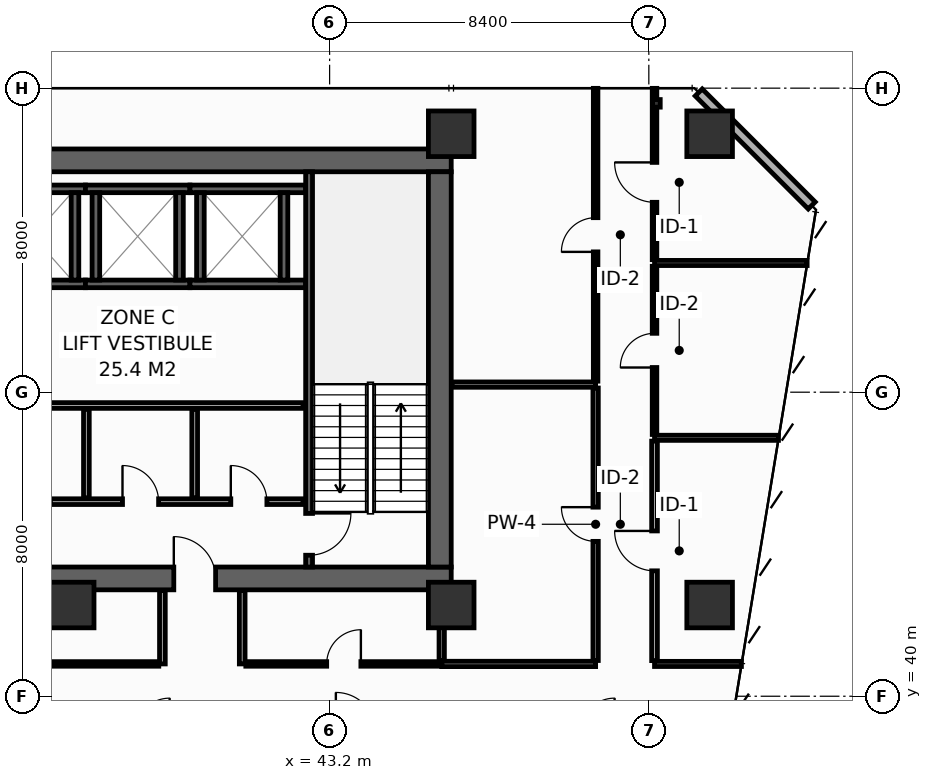
"""IFC4 building model, lengths in metres.
Left out: names, types, materials, properties, quantities, classifications, styles, units other than length and angle.
Written with IfcOpenShell. Run it as: python <this file> out.ifc"""

import sys

from ifc_helpers import new_model, si_unit, direction, frame, frame_2d, origin, origin_2d, place, context, subcontext, project, spatial, rectangle, hollow_rectangle, extrude, element, fill, save


model = new_model("IFC4")
c1 = context("Model", 3, precision=1e-05, world=origin(), true_north=direction((0.0, 1.0)))
c2 = subcontext(c1, "Body", "Model", "MODEL_VIEW")
j1 = project(units=[si_unit("LENGTHUNIT", "METRE"), si_unit("PLANEANGLEUNIT", "RADIAN")], contexts=[c1])
p1 = place(None, origin())
s1 = spatial("IfcSite", under=j1, at=p1, CompositionType="ELEMENT")
p2 = place(p1, origin())
s2 = spatial("IfcBuilding", under=s1, at=p2, CompositionType="ELEMENT")
p3 = place(p2, frame((0.0, 0.0, 69.2)))
s3 = spatial("IfcBuildingStorey", under=s2, at=p3, CompositionType="ELEMENT", Elevation=69.2)
p4 = place(p3, frame((13.5, 43.1, 0.0), z_axis=(0.0, 0.0, 1.0), x_axis=(1.0, 0.0, 0.0)))
e1 = element("IfcWall", 1, at=p4, inside=s3, PredefinedType="SHEAR", context=c2, shape_type="SweptSolid", body=[
    extrude(rectangle(XDim=32.9, YDim=0.6, at=frame_2d((16.45, 0.0))), origin(), (0.0, 0.0, 1.0), 4.15),
])
p5 = place(p4, frame((5.4, 0.0, 0.0)))
e2 = element("IfcOpeningElement", 2, at=p5, cuts=e1, PredefinedType="OPENING", context=c2, shape_type="SweptSolid", body=[
    extrude(rectangle(XDim=1.1, YDim=2.15, at=frame_2d((0.55, 1.075))), frame((0.0, 0.31, 0.0), z_axis=(0.0, -1.0, 0.0), x_axis=(1.0, 0.0, 0.0)), (0.0, 0.0, 1.0), 0.62),
])
p6 = place(p4, frame((25.6, 0.0, 0.0)))
e3 = element("IfcOpeningElement", 3, at=p6, cuts=e1, PredefinedType="OPENING", context=c2, shape_type="SweptSolid", body=[
    extrude(rectangle(XDim=1.1, YDim=2.15, at=frame_2d((0.55, 1.075))), frame((0.0, 0.31, 0.0), z_axis=(0.0, -1.0, 0.0), x_axis=(1.0, 0.0, 0.0)), (0.0, 0.0, 1.0), 0.62),
])
p7 = place(p3, frame((13.5, 54.1, 0.0), z_axis=(0.0, 0.0, 1.0), x_axis=(1.0, 0.0, 0.0)))
e4 = element("IfcWall", 4, at=p7, inside=s3, PredefinedType="SHEAR", context=c2, shape_type="SweptSolid", body=[
    extrude(rectangle(XDim=32.9, YDim=0.6, at=frame_2d((16.45, 0.0))), origin(), (0.0, 0.0, 1.0), 4.15),
])
p8 = place(p3, frame((46.1, 43.4, 0.0), z_axis=(0.0, 0.0, 1.0), x_axis=(0.0, 1.0, 0.0)))
e5 = element("IfcWall", 5, at=p8, inside=s3, PredefinedType="SHEAR", context=c2, shape_type="SweptSolid", body=[
    extrude(rectangle(XDim=10.4, YDim=0.6, at=frame_2d((5.2, 0.0))), origin(), (0.0, 0.0, 1.0), 4.15),
])
for number, where, z_axis, x_axis in (
    (6, (46.4, 54.8, 0.0), (0.0, 0.0, 1.0), (1.0, 0.0, 0.0)),
    (7, (53.2, 54.8, 0.0), (0.0, 0.0, 1.0), (1.0, 0.0, 0.0)),
    (8, (36.4, 42.4, 0.0), (0.0, 0.0, 1.0), (1.0, 0.0, 0.0)),
    (9, (46.4, 42.4, 0.0), (0.0, 0.0, 1.0), (1.0, 0.0, 0.0)),
    (10, (53.2, 42.4, 0.0), (0.0, 0.0, 1.0), (1.0, 0.0, 0.0)),
):
    element("IfcColumn", number, at=place(p3, frame(where, z_axis=z_axis, x_axis=x_axis)), inside=s3, PredefinedType="COLUMN", context=c2, shape_type="SweptSolid", body=[
        extrude(hollow_rectangle(XDim=1.2, YDim=1.2, WallThickness=0.055, at=origin_2d()), origin(), (0.0, 0.0, 1.0), 4.4),
    ])
p9 = place(p3, frame((51.8, 55.6, 0.0), z_axis=(0.0, 0.0, 1.0), x_axis=(1.0, 0.0, 0.0)))
e11 = element("IfcColumn", 11, at=p9, inside=s3, PredefinedType="PILASTER", context=c2, shape_type="SweptSolid", body=[
    extrude(hollow_rectangle(XDim=0.2, YDim=0.2, WallThickness=0.01, at=origin_2d()), origin(), (0.0, 0.0, 1.0), 4.4),
])
for number, where, z_axis, x_axis in (
    (12, (33.95, 50.85, 0.0), (0.0, 0.0, 1.0), (1.0, 0.0, 0.0)),
    (13, (33.95, 53.35, 0.0), (0.0, 0.0, 1.0), (1.0, 0.0, 0.0)),
):
    element("IfcWall", number, at=place(p3, frame(where, z_axis=z_axis, x_axis=x_axis)), inside=s3, PredefinedType="SHEAR", context=c2, shape_type="SweptSolid", body=[
        extrude(rectangle(XDim=2.825, YDim=0.2, at=frame_2d((1.413, 0.0))), origin(), (0.0, 0.0, 1.0), 4.15),
    ])
p10 = place(p3, frame((36.5, 50.95, 0.0), z_axis=(0.0, 0.0, 1.0), x_axis=(0.0, 1.0, 0.0)))
e14 = element("IfcWall", 14, at=p10, inside=s3, PredefinedType="SHEAR", context=c2, shape_type="SweptSolid", body=[
    extrude(rectangle(XDim=2.3, YDim=0.2, at=frame_2d((1.15, 0.0))), origin(), (0.0, 0.0, 1.0), 4.15),
])
for number, where, z_axis, x_axis in (
    (15, (36.775, 50.85, 0.0), (0.0, 0.0, 1.0), (1.0, 0.0, 0.0)),
    (16, (36.775, 53.35, 0.0), (0.0, 0.0, 1.0), (1.0, 0.0, 0.0)),
):
    element("IfcWall", number, at=place(p3, frame(where, z_axis=z_axis, x_axis=x_axis)), inside=s3, PredefinedType="SHEAR", context=c2, shape_type="SweptSolid", body=[
        extrude(rectangle(XDim=2.75, YDim=0.2, at=frame_2d((1.375, 0.0))), origin(), (0.0, 0.0, 1.0), 4.15),
    ])
for number, where, z_axis, x_axis in (
    (17, (37.05, 50.95, 0.0), (0.0, 0.0, 1.0), (0.0, 1.0, 0.0)),
    (18, (39.25, 50.95, 0.0), (0.0, 0.0, 1.0), (0.0, 1.0, 0.0)),
):
    element("IfcWall", number, at=place(p3, frame(where, z_axis=z_axis, x_axis=x_axis)), inside=s3, PredefinedType="SHEAR", context=c2, shape_type="SweptSolid", body=[
        extrude(rectangle(XDim=2.3, YDim=0.2, at=frame_2d((1.15, 0.0))), origin(), (0.0, 0.0, 1.0), 4.15),
    ])
for number, where, z_axis, x_axis in (
    (19, (39.525, 50.85, 0.0), (0.0, 0.0, 1.0), (1.0, 0.0, 0.0)),
    (20, (39.525, 53.35, 0.0), (0.0, 0.0, 1.0), (1.0, 0.0, 0.0)),
):
    element("IfcWall", number, at=place(p3, frame(where, z_axis=z_axis, x_axis=x_axis)), inside=s3, PredefinedType="SHEAR", context=c2, shape_type="SweptSolid", body=[
        extrude(rectangle(XDim=3.045, YDim=0.2, at=frame_2d((1.522, 0.0))), origin(), (0.0, 0.0, 1.0), 4.15),
    ])
for number, where, z_axis, x_axis in (
    (21, (39.8, 50.95, 0.0), (0.0, 0.0, 1.0), (0.0, 1.0, 0.0)),
    (22, (42.0, 50.95, 0.0), (0.0, 0.0, 1.0), (0.0, 1.0, 0.0)),
):
    element("IfcWall", number, at=place(p3, frame(where, z_axis=z_axis, x_axis=x_axis)), inside=s3, PredefinedType="SHEAR", context=c2, shape_type="SweptSolid", body=[
        extrude(rectangle(XDim=2.3, YDim=0.2, at=frame_2d((1.15, 0.0))), origin(), (0.0, 0.0, 1.0), 4.15),
    ])
p11 = place(p3, frame((42.66, 53.8, 0.0), z_axis=(0.0, 0.0, 1.0), x_axis=(0.0, -1.0, 0.0)))
e23 = element("IfcWall", 23, at=p11, inside=s3, PredefinedType="SHEAR", context=c2, shape_type="SweptSolid", body=[
    extrude(rectangle(XDim=10.4, YDim=0.18, at=frame_2d((5.2, 0.0))), origin(), (0.0, 0.0, 1.0), 4.15),
])
p12 = place(p11, frame((8.99, 0.0, 0.0)))
e24 = element("IfcOpeningElement", 24, at=p12, cuts=e23, PredefinedType="OPENING", context=c2, shape_type="SweptSolid", body=[
    extrude(rectangle(XDim=1.1, YDim=2.15, at=frame_2d((0.55, 1.075))), frame((0.0, 0.1, 0.0), z_axis=(0.0, -1.0, 0.0), x_axis=(1.0, 0.0, 0.0)), (0.0, 0.0, 1.0), 0.2),
])
p13 = place(p3, frame((33.95, 45.12, 0.0), z_axis=(0.0, 0.0, 1.0), x_axis=(1.0, 0.0, 0.0)))
e25 = element("IfcWall", 25, at=p13, inside=s3, PredefinedType="PARTITIONING", context=c2, shape_type="SweptSolid", body=[
    extrude(rectangle(XDim=8.55, YDim=0.15, at=frame_2d((4.275, 0.0))), origin(), (0.0, 0.0, 1.0), 4.15),
])
p14 = place(p13, frame((0.95, 0.0, 0.0)))
e26 = element("IfcOpeningElement", 26, at=p14, cuts=e25, PredefinedType="OPENING", context=c2, shape_type="SweptSolid", body=[
    extrude(rectangle(XDim=0.95, YDim=2.15, at=frame_2d((0.475, 1.075))), frame((0.0, 0.085, 0.0), z_axis=(0.0, -1.0, 0.0), x_axis=(1.0, 0.0, 0.0)), (0.0, 0.0, 1.0), 0.17),
])
p15 = place(p13, frame((3.8, 0.0, 0.0)))
e27 = element("IfcOpeningElement", 27, at=p15, cuts=e25, PredefinedType="OPENING", context=c2, shape_type="SweptSolid", body=[
    extrude(rectangle(XDim=0.95, YDim=2.15, at=frame_2d((0.475, 1.075))), frame((0.0, 0.085, 0.0), z_axis=(0.0, -1.0, 0.0), x_axis=(1.0, 0.0, 0.0)), (0.0, 0.0, 1.0), 0.17),
])
p16 = place(p13, frame((6.65, 0.0, 0.0)))
e28 = element("IfcOpeningElement", 28, at=p16, cuts=e25, PredefinedType="OPENING", context=c2, shape_type="SweptSolid", body=[
    extrude(rectangle(XDim=0.95, YDim=2.15, at=frame_2d((0.475, 1.075))), frame((0.0, 0.085, 0.0), z_axis=(0.0, -1.0, 0.0), x_axis=(1.0, 0.0, 0.0)), (0.0, 0.0, 1.0), 0.17),
])
p17 = place(p3, frame((33.95, 47.65, 0.0), z_axis=(0.0, 0.0, 1.0), x_axis=(1.0, 0.0, 0.0)))
e29 = element("IfcWall", 29, at=p17, inside=s3, PredefinedType="PARTITIONING", context=c2, shape_type="SweptSolid", body=[
    extrude(rectangle(XDim=8.55, YDim=0.15, at=frame_2d((4.275, 0.0))), origin(), (0.0, 0.0, 1.0), 4.15),
])
for number, where, z_axis, x_axis in (
    (30, (36.8, 45.22, 0.0), (0.0, 0.0, 1.0), (0.0, 1.0, 0.0)),
    (31, (39.65, 45.22, 0.0), (0.0, 0.0, 1.0), (0.0, 1.0, 0.0)),
):
    element("IfcWall", number, at=place(p3, frame(where, z_axis=z_axis, x_axis=x_axis)), inside=s3, PredefinedType="PARTITIONING", context=c2, shape_type="SweptSolid", body=[
        extrude(rectangle(XDim=2.33, YDim=0.15, at=frame_2d((1.165, 0.0))), origin(), (0.0, 0.0, 1.0), 4.15),
    ])
p18 = place(p3, frame((55.887, 52.913, 0.0), z_axis=(0.0, 0.0, 1.0), x_axis=(-0.707106781187, 0.707106781187, 0.0)))
e32 = element("IfcWall", 32, at=p18, inside=s3, PredefinedType="STANDARD", context=c2, shape_type="SweptSolid", body=[
    extrude(rectangle(XDim=4.206, YDim=0.26, at=frame_2d((2.103, 0.0))), origin(), (0.0, 0.0, 1.0), 4.15),
])
p19 = place(p3, frame((46.15, 40.85, 0.0), z_axis=(0.0, 0.0, 1.0), x_axis=(1.0, 0.0, 0.0)))
e33 = element("IfcWall", 33, at=p19, inside=s3, PredefinedType="PARTITIONING", context=c2, shape_type="SweptSolid", body=[
    extrude(rectangle(XDim=4.05, YDim=0.14, at=frame_2d((2.025, 0.0))), origin(), (0.0, 0.0, 1.0), 4.15),
])
p20 = place(p3, frame((46.15, 40.94, 0.0), z_axis=(0.0, 0.0, 1.0), x_axis=(0.0, 1.0, 0.0)))
e34 = element("IfcWall", 34, at=p20, inside=s3, PredefinedType="PARTITIONING", context=c2, shape_type="SweptSolid", body=[
    extrude(rectangle(XDim=1.84, YDim=0.14, at=frame_2d((0.92, 0.0))), origin(), (0.0, 0.0, 1.0), 4.15),
])
p21 = place(p3, frame((46.42, 48.2, 0.0), z_axis=(0.0, 0.0, 1.0), x_axis=(1.0, 0.0, 0.0)))
e35 = element("IfcWall", 35, at=p21, inside=s3, PredefinedType="PARTITIONING", context=c2, shape_type="SweptSolid", body=[
    extrude(rectangle(XDim=3.78, YDim=0.14, at=frame_2d((1.89, 0.0))), origin(), (0.0, 0.0, 1.0), 4.15),
])
p22 = place(p3, frame((50.2, 40.94, 0.0), z_axis=(0.0, 0.0, 1.0), x_axis=(0.0, 1.0, 0.0)))
e36 = element("IfcWall", 36, at=p22, inside=s3, PredefinedType="PARTITIONING", context=c2, shape_type="SweptSolid", body=[
    extrude(rectangle(XDim=7.17, YDim=0.14, at=frame_2d((3.585, 0.0))), origin(), (0.0, 0.0, 1.0), 3.335),
])
p23 = place(p22, frame((3.135, 0.0, 0.0)))
e37 = element("IfcOpeningElement", 37, at=p23, cuts=e36, PredefinedType="OPENING", context=c2, shape_type="SweptSolid", body=[
    extrude(rectangle(XDim=0.9, YDim=2.1, at=frame_2d((0.45, 1.05))), frame((0.0, 0.08, 0.0), z_axis=(0.0, -1.0, 0.0), x_axis=(1.0, 0.0, 0.0)), (0.0, 0.0, 1.0), 0.16),
])
p24 = place(p3, frame((50.2, 48.29, 0.0), z_axis=(0.0, 0.0, 1.0), x_axis=(0.0, 1.0, 0.0)))
e38 = element("IfcWall", 38, at=p24, inside=s3, PredefinedType="PARTITIONING", context=c2, shape_type="SweptSolid", body=[
    extrude(rectangle(XDim=7.705, YDim=0.12, at=frame_2d((3.853, 0.0))), origin(), (0.0, 0.0, 1.0), 3.435),
])
p25 = place(p24, frame((3.402, 0.0, 0.0)))
e39 = element("IfcOpeningElement", 39, at=p25, cuts=e38, PredefinedType="OPENING", context=c2, shape_type="SweptSolid", body=[
    extrude(rectangle(XDim=0.9, YDim=2.1, at=frame_2d((0.45, 1.05))), frame((0.0, 0.07, 0.0), z_axis=(0.0, -1.0, 0.0), x_axis=(1.0, 0.0, 0.0)), (0.0, 0.0, 1.0), 0.14),
])
p26 = place(p3, frame((51.75, 40.85, 0.0), z_axis=(0.0, 0.0, 1.0), x_axis=(1.0, 0.0, 0.0)))
e40 = element("IfcWall", 40, at=p26, inside=s3, PredefinedType="PARTITIONING", context=c2, shape_type="SweptSolid", body=[
    extrude(rectangle(XDim=2.287, YDim=0.135, at=frame_2d((1.143, 0.0))), origin(), (0.0, 0.0, 1.0), 3.635),
])
p27 = place(p3, frame((51.75, 46.8, 0.0), z_axis=(0.0, 0.0, 1.0), x_axis=(1.0, 0.0, 0.0)))
e41 = element("IfcWall", 41, at=p27, inside=s3, PredefinedType="PARTITIONING", context=c2, shape_type="SweptSolid", body=[
    extrude(rectangle(XDim=3.262, YDim=0.135, at=frame_2d((1.631, 0.0))), origin(), (0.0, 0.0, 1.0), 3.335),
])
p28 = place(p3, frame((51.75, 51.4, 0.0), z_axis=(0.0, 0.0, 1.0), x_axis=(1.0, 0.0, 0.0)))
e42 = element("IfcWall", 42, at=p28, inside=s3, PredefinedType="PARTITIONING", context=c2, shape_type="SweptSolid", body=[
    extrude(rectangle(XDim=4.015, YDim=0.135, at=frame_2d((2.008, 0.0))), origin(), (0.0, 0.0, 1.0), 3.335),
])
p29 = place(p3, frame((51.75, 40.938, 0.0), z_axis=(0.0, 0.0, 1.0), x_axis=(0.0, 1.0, 0.0)))
e43 = element("IfcWall", 43, at=p29, inside=s3, PredefinedType="PARTITIONING", context=c2, shape_type="SweptSolid", body=[
    extrude(rectangle(XDim=5.775, YDim=0.15, at=frame_2d((2.887, 0.0))), origin(), (0.0, 0.0, 1.0), 3.335),
])
p30 = place(p29, frame((2.362, 0.0, 0.0)))
e44 = element("IfcOpeningElement", 44, at=p30, cuts=e43, PredefinedType="OPENING", context=c2, shape_type="SweptSolid", body=[
    extrude(rectangle(XDim=1.05, YDim=2.15, at=frame_2d((0.525, 1.075))), frame((0.0, 0.085, 0.0), z_axis=(0.0, -1.0, 0.0), x_axis=(1.0, 0.0, 0.0)), (0.0, 0.0, 1.0), 0.17),
])
p31 = place(p3, frame((51.75, 46.887, 0.0), z_axis=(0.0, 0.0, 1.0), x_axis=(0.0, 1.0, 0.0)))
e45 = element("IfcWall", 45, at=p31, inside=s3, PredefinedType="PARTITIONING", context=c2, shape_type="SweptSolid", body=[
    extrude(rectangle(XDim=4.425, YDim=0.12, at=frame_2d((2.212, 0.0))), origin(), (0.0, 0.0, 1.0), 4.15),
])
p32 = place(p31, frame((1.762, 0.0, 0.0)))
e46 = element("IfcOpeningElement", 46, at=p32, cuts=e45, PredefinedType="OPENING", context=c2, shape_type="SweptSolid", body=[
    extrude(rectangle(XDim=0.9, YDim=2.1, at=frame_2d((0.45, 1.05))), frame((0.0, 0.07, 0.0), z_axis=(0.0, -1.0, 0.0), x_axis=(1.0, 0.0, 0.0)), (0.0, 0.0, 1.0), 0.14),
])
p33 = place(p3, frame((51.75, 51.488, 0.0), z_axis=(0.0, 0.0, 1.0), x_axis=(0.0, 1.0, 0.0)))
e47 = element("IfcWall", 47, at=p33, inside=s3, PredefinedType="PARTITIONING", context=c2, shape_type="SweptSolid", body=[
    extrude(rectangle(XDim=4.508, YDim=0.12, at=frame_2d((2.254, 0.0))), origin(), (0.0, 0.0, 1.0), 3.435),
])
p34 = place(p33, frame((1.509, 0.0, 0.0)))
e48 = element("IfcOpeningElement", 48, at=p34, cuts=e47, PredefinedType="OPENING", context=c2, shape_type="SweptSolid", body=[
    extrude(rectangle(XDim=1.05, YDim=2.15, at=frame_2d((0.525, 1.075))), frame((0.0, 0.07, 0.0), z_axis=(0.0, -1.0, 0.0), x_axis=(1.0, 0.0, 0.0)), (0.0, 0.0, 1.0), 0.14),
])
for number, where, z_axis, x_axis in (
    (49, (38.8, 40.85, 0.0), (0.0, 0.0, 1.0), (0.0, 1.0, 0.0)),
    (50, (40.9, 40.85, 0.0), (0.0, 0.0, 1.0), (0.0, 1.0, 0.0)),
):
    element("IfcWall", number, at=place(p3, frame(where, z_axis=z_axis, x_axis=x_axis)), inside=s3, PredefinedType="PARTITIONING", context=c2, shape_type="SweptSolid", body=[
        extrude(rectangle(XDim=1.93, YDim=0.15, at=frame_2d((0.965, 0.0))), origin(), (0.0, 0.0, 1.0), 4.15),
    ])
p35 = place(p3, frame((33.08, 40.85, 0.0), z_axis=(0.0, 0.0, 1.0), x_axis=(1.0, 0.0, 0.0)))
e51 = element("IfcWall", 51, at=p35, inside=s3, PredefinedType="PARTITIONING", context=c2, shape_type="SweptSolid", body=[
    extrude(rectangle(XDim=5.625, YDim=0.12, at=frame_2d((2.812, 0.0))), origin(), (0.0, 0.0, 1.0), 3.335),
])
p36 = place(p35, frame((1.483, 0.0, 0.0)))
e52 = element("IfcOpeningElement", 52, at=p36, cuts=e51, PredefinedType="OPENING", context=c2, shape_type="SweptSolid", body=[
    extrude(rectangle(XDim=0.9, YDim=2.1, at=frame_2d((0.45, 1.05))), frame((0.0, 0.07, 0.0), z_axis=(0.0, -1.0, 0.0), x_axis=(1.0, 0.0, 0.0)), (0.0, 0.0, 1.0), 0.14),
])
p37 = place(p3, frame((40.995, 40.85, 0.0), z_axis=(0.0, 0.0, 1.0), x_axis=(1.0, 0.0, 0.0)))
e53 = element("IfcWall", 53, at=p37, inside=s3, PredefinedType="PARTITIONING", context=c2, shape_type="SweptSolid", body=[
    extrude(rectangle(XDim=5.155, YDim=0.12, at=frame_2d((2.577, 0.0))), origin(), (0.0, 0.0, 1.0), 4.15),
])
p38 = place(p37, frame((2.128, 0.0, 0.0)))
e54 = element("IfcOpeningElement", 54, at=p38, cuts=e53, PredefinedType="OPENING", context=c2, shape_type="SweptSolid", body=[
    extrude(rectangle(XDim=0.9, YDim=2.1, at=frame_2d((0.45, 1.05))), frame((0.0, 0.07, 0.0), z_axis=(0.0, -1.0, 0.0), x_axis=(1.0, 0.0, 0.0)), (0.0, 0.0, 1.0), 0.14),
])
p39 = place(p12, origin())
e55 = element("IfcDoor", 55, at=p39, inside=s3, OperationType="SINGLE_SWING_LEFT", PredefinedType="DOOR", context=c2, shape_type="SweptSolid", body=[
    extrude(rectangle(XDim=1.1, YDim=2.15, at=frame_2d((0.55, 1.075))), frame((0.0, 0.025, 0.0), z_axis=(0.0, -1.0, 0.0), x_axis=(1.0, 0.0, 0.0)), (0.0, 0.0, 1.0), 0.05),
])
fill(e24, e55)
p40 = place(p6, origin())
e56 = element("IfcDoor", 56, at=p40, inside=s3, OperationType="SINGLE_SWING_LEFT", PredefinedType="DOOR", context=c2, shape_type="SweptSolid", body=[
    extrude(rectangle(XDim=1.1, YDim=2.15, at=frame_2d((0.55, 1.075))), frame((0.0, 0.025, 0.0), z_axis=(0.0, -1.0, 0.0), x_axis=(1.0, 0.0, 0.0)), (0.0, 0.0, 1.0), 0.05),
])
fill(e3, e56)
p41 = place(p15, origin())
e57 = element("IfcDoor", 57, at=p41, inside=s3, OperationType="SINGLE_SWING_LEFT", PredefinedType="DOOR", context=c2, shape_type="SweptSolid", body=[
    extrude(rectangle(XDim=0.95, YDim=2.15, at=frame_2d((0.475, 1.075))), frame((0.0, 0.025, 0.0), z_axis=(0.0, -1.0, 0.0), x_axis=(1.0, 0.0, 0.0)), (0.0, 0.0, 1.0), 0.05),
])
fill(e27, e57)
p42 = place(p16, origin())
e58 = element("IfcDoor", 58, at=p42, inside=s3, OperationType="SINGLE_SWING_LEFT", PredefinedType="DOOR", context=c2, shape_type="SweptSolid", body=[
    extrude(rectangle(XDim=0.95, YDim=2.15, at=frame_2d((0.475, 1.075))), frame((0.0, 0.025, 0.0), z_axis=(0.0, -1.0, 0.0), x_axis=(1.0, 0.0, 0.0)), (0.0, 0.0, 1.0), 0.05),
])
fill(e28, e58)
p43 = place(p23, origin())
e59 = element("IfcDoor", 59, at=p43, inside=s3, OperationType="SINGLE_SWING_RIGHT", PredefinedType="DOOR", context=c2, shape_type="SweptSolid", body=[
    extrude(rectangle(XDim=0.9, YDim=2.1, at=frame_2d((0.45, 1.05))), frame((0.0, 0.025, 0.0), z_axis=(0.0, -1.0, 0.0), x_axis=(1.0, 0.0, 0.0)), (0.0, 0.0, 1.0), 0.05),
])
fill(e37, e59)
p44 = place(p25, origin())
e60 = element("IfcDoor", 60, at=p44, inside=s3, OperationType="SINGLE_SWING_LEFT", PredefinedType="DOOR", context=c2, shape_type="SweptSolid", body=[
    extrude(rectangle(XDim=0.9, YDim=2.1, at=frame_2d((0.45, 1.05))), frame((0.0, 0.025, 0.0), z_axis=(0.0, -1.0, 0.0), x_axis=(1.0, 0.0, 0.0)), (0.0, 0.0, 1.0), 0.05),
])
fill(e39, e60)
p45 = place(p30, origin())
e61 = element("IfcDoor", 61, at=p45, inside=s3, OperationType="SINGLE_SWING_RIGHT", PredefinedType="DOOR", context=c2, shape_type="SweptSolid", body=[
    extrude(rectangle(XDim=1.05, YDim=2.15, at=frame_2d((0.525, 1.075))), frame((0.0, 0.025, 0.0), z_axis=(0.0, -1.0, 0.0), x_axis=(1.0, 0.0, 0.0)), (0.0, 0.0, 1.0), 0.05),
])
fill(e44, e61)
p46 = place(p32, origin())
e62 = element("IfcDoor", 62, at=p46, inside=s3, OperationType="SINGLE_SWING_LEFT", PredefinedType="DOOR", context=c2, shape_type="SweptSolid", body=[
    extrude(rectangle(XDim=0.9, YDim=2.1, at=frame_2d((0.45, 1.05))), frame((0.0, 0.025, 0.0), z_axis=(0.0, -1.0, 0.0), x_axis=(1.0, 0.0, 0.0)), (0.0, 0.0, 1.0), 0.05),
])
fill(e46, e62)
p47 = place(p34, origin())
e63 = element("IfcDoor", 63, at=p47, inside=s3, OperationType="SINGLE_SWING_RIGHT", PredefinedType="DOOR", context=c2, shape_type="SweptSolid", body=[
    extrude(rectangle(XDim=1.05, YDim=2.15, at=frame_2d((0.525, 1.075))), frame((0.0, 0.025, 0.0), z_axis=(0.0, -1.0, 0.0), x_axis=(1.0, 0.0, 0.0)), (0.0, 0.0, 1.0), 0.05),
])
fill(e48, e63)
p48 = place(p38, origin())
e64 = element("IfcDoor", 64, at=p48, inside=s3, OperationType="SINGLE_SWING_RIGHT", PredefinedType="DOOR", context=c2, shape_type="SweptSolid", body=[
    extrude(rectangle(XDim=0.9, YDim=2.1, at=frame_2d((0.45, 1.05))), frame((0.0, 0.025, 0.0), z_axis=(0.0, -1.0, 0.0), x_axis=(1.0, 0.0, 0.0)), (0.0, 0.0, 1.0), 0.05),
])
fill(e54, e64)
save(model, sys.argv[1])
